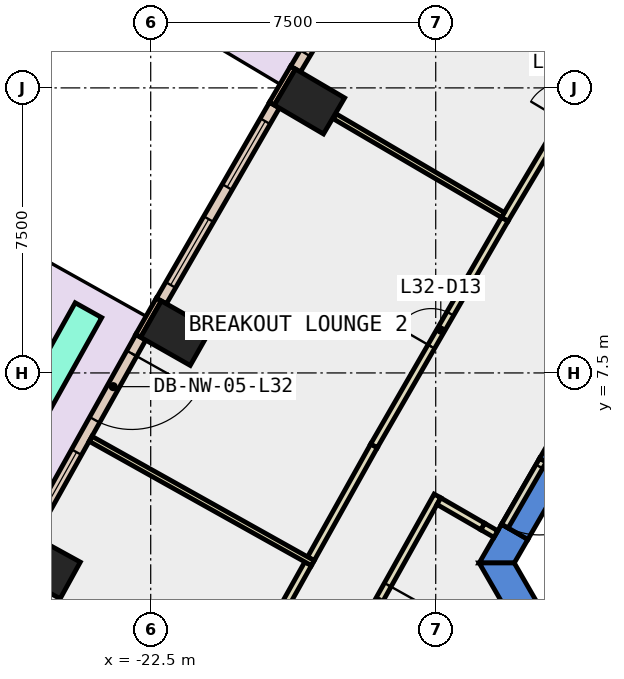
"""IFC4 building model, lengths in metres.
Left out: names, types, materials, properties, quantities, classifications, styles, units other than length and angle.
Written with IfcOpenShell. Run it as: python <this file> out.ifc"""

import sys

from ifc_helpers import new_model, si_unit, direction, frame, frame_2d, origin, origin_2d, place, context, subcontext, project, spatial, polyline, rectangle, outline, extrude, element, fill, save


model = new_model("IFC4")
c1 = context("Model", 3, precision=1e-05, world=origin(), true_north=direction((0.0, 1.0)))
c2 = subcontext(c1, "Body", "Model", "MODEL_VIEW")
j1 = project(units=[si_unit("LENGTHUNIT", "METRE"), si_unit("PLANEANGLEUNIT", "RADIAN")], contexts=[c1])
p1 = place(None, origin())
s1 = spatial("IfcSite", under=j1, at=p1, CompositionType="ELEMENT")
p2 = place(p1, origin())
s2 = spatial("IfcBuilding", under=s1, at=p2, CompositionType="ELEMENT")
p3 = place(p2, frame((0.0, 0.0, 146.6)))
s3 = spatial("IfcBuildingStorey", under=s2, at=p3, CompositionType="ELEMENT", Elevation=146.6)
for number, where, z_axis, x_axis in (
    (1, (-18.322, 14.642, -0.4), (0.0, 0.0, 1.0), (0.506, 0.863, 0.0)),
    (2, (-21.84, 8.546, -0.4), (0.0, 0.0, 1.0), (0.494, 0.869, 0.0)),
    (3, (-25.275, 2.403, -0.4), (0.0, 0.0, 1.0), (0.482, 0.876, 0.0)),
):
    element("IfcColumn", number, at=place(p3, frame(where, z_axis=z_axis, x_axis=x_axis)), inside=s3, PredefinedType="COLUMN", context=c2, shape_type="SweptSolid", body=[
        extrude(rectangle(XDim=1.1, YDim=1.5, at=origin_2d()), origin(), (0.0, 0.0, 1.0), 4.2),
    ])
p4 = place(p3, frame((0.0, 0.0, -0.4)))
e4 = element("IfcWall", 4, at=p4, inside=s3, PredefinedType="SHEAR", context=c2, shape_type="SweptSolid", body=[
    extrude(outline(polyline([(-12.267, 5.252), (-11.575, 4.852), (-6.466, 13.7), (-6.928, 14.5), (-12.267, 5.252)])), origin(), (0.0, 0.0, 1.0), 4.2),
])
p5 = place(p3, frame((0.0, 0.0, -0.4)))
e5 = element("IfcWall", 5, at=p5, inside=s3, PredefinedType="SHEAR", context=c2, shape_type="SweptSolid", body=[
    extrude(outline(polyline([(-12.575, 3.12), (-13.267, 3.52), (-13.856, 2.5), (-12.933, 2.5), (-12.575, 3.12)])), origin(), (0.0, 0.0, 1.0), 4.2),
])
p6 = place(p3, frame((0.0, 0.0, 3.6)))
e6 = element("IfcWall", 6, at=p6, inside=s3, PredefinedType="SHEAR", context=c2, shape_type="SweptSolid", body=[
    extrude(outline(polyline([(-13.267, 3.52), (-12.575, 3.12), (-11.575, 4.852), (-12.267, 5.252), (-13.267, 3.52)])), origin(), (0.0, 0.0, 1.0), 0.2),
])
p7 = place(p3, frame((0.0, 0.0, -0.4)))
e7 = element("IfcWall", 7, at=p7, inside=s3, PredefinedType="SHEAR", context=c2, shape_type="SweptSolid", body=[
    extrude(outline(polyline([(-13.856, 2.5), (-6.928, -9.5), (-6.466, -8.7), (-12.933, 2.5), (-13.856, 2.5)])), origin(), (0.0, 0.0, 1.0), 4.2),
])
p8 = place(p3, frame((-18.755, 15.533, 0.0), z_axis=(0.0, 0.0, 1.0), x_axis=(-0.50667077411, -0.862139621327, 0.0)))
e8 = element("IfcWall", 8, at=p8, inside=s3, PredefinedType="STANDARD", context=c2, shape_type="SweptSolid", body=[
    extrude(rectangle(XDim=1.1, YDim=0.15, at=frame_2d((0.55, 0.0))), origin(), (0.0, 0.0, 1.0), 3.8),
])
p9 = place(p3, frame((-22.286, 9.432, 0.0), z_axis=(0.0, 0.0, 1.0), x_axis=(-0.494775760346, -0.869020682708, 0.0)))
e9 = element("IfcWall", 9, at=p9, inside=s3, PredefinedType="STANDARD", context=c2, shape_type="SweptSolid", body=[
    extrude(rectangle(XDim=1.1, YDim=0.15, at=frame_2d((0.55, 0.0))), origin(), (0.0, 0.0, 1.0), 3.8),
])
p10 = place(p3, frame((-15.642, 20.605, 0.0), z_axis=(0.0, 0.0, 1.0), x_axis=(-0.511856715331, -0.859070836992, 0.0)))
e10 = element("IfcWall", 10, at=p10, inside=s3, PredefinedType="STANDARD", context=c2, shape_type="SweptSolid", body=[
    extrude(rectangle(XDim=5.951, YDim=0.3, at=frame_2d((2.975, 0.0))), origin(), (0.0, 0.0, 1.0), 3.8),
])
p11 = place(p10, frame((0.488, 0.0, 0.0)))
e11 = element("IfcOpeningElement", 11, at=p11, cuts=e10, PredefinedType="OPENING", context=c2, shape_type="SweptSolid", body=[
    extrude(rectangle(XDim=2.0, YDim=2.4, at=frame_2d((1.0, 1.2))), frame((0.0, 0.16, 0.0), z_axis=(0.0, -1.0, 0.0), x_axis=(1.0, 0.0, 0.0)), (0.0, 0.0, 1.0), 0.32),
])
p12 = place(p10, frame((3.463, 0.0, 0.9)))
e12 = element("IfcOpeningElement", 12, at=p12, cuts=e10, PredefinedType="OPENING", context=c2, shape_type="SweptSolid", body=[
    extrude(rectangle(XDim=2.0, YDim=2.6, at=frame_2d((1.0, 1.3))), frame((0.0, 0.16, 0.0), z_axis=(0.0, -1.0, 0.0), x_axis=(1.0, 0.0, 0.0)), (0.0, 0.0, 1.0), 0.32),
])
p13 = place(p3, frame((-19.243, 14.546, 0.0), z_axis=(0.0, 0.0, 1.0), x_axis=(-0.49994263896, -0.866058518664, 0.0)))
e13 = element("IfcWall", 13, at=p13, inside=s3, PredefinedType="STANDARD", context=c2, shape_type="SweptSolid", body=[
    extrude(rectangle(XDim=5.951, YDim=0.3, at=frame_2d((2.976, 0.0))), origin(), (0.0, 0.0, 1.0), 3.8),
])
p14 = place(p13, frame((0.488, 0.0, 0.9)))
e14 = element("IfcOpeningElement", 14, at=p14, cuts=e13, PredefinedType="OPENING", context=c2, shape_type="SweptSolid", body=[
    extrude(rectangle(XDim=2.0, YDim=2.6, at=frame_2d((1.0, 1.3))), frame((0.0, 0.16, 0.0), z_axis=(0.0, -1.0, 0.0), x_axis=(1.0, 0.0, 0.0)), (0.0, 0.0, 1.0), 0.32),
])
p15 = place(p13, frame((3.463, 0.0, 0.9)))
e15 = element("IfcOpeningElement", 15, at=p15, cuts=e13, PredefinedType="OPENING", context=c2, shape_type="SweptSolid", body=[
    extrude(rectangle(XDim=2.0, YDim=2.6, at=frame_2d((1.0, 1.3))), frame((0.0, 0.16, 0.0), z_axis=(0.0, -1.0, 0.0), x_axis=(1.0, 0.0, 0.0)), (0.0, 0.0, 1.0), 0.32),
])
p16 = place(p3, frame((-22.761, 8.438, 0.0), z_axis=(0.0, 0.0, 1.0), x_axis=(-0.488009846284, -0.872838123555, 0.0)))
e16 = element("IfcWall", 16, at=p16, inside=s3, PredefinedType="STANDARD", context=c2, shape_type="SweptSolid", body=[
    extrude(rectangle(XDim=5.951, YDim=0.3, at=frame_2d((2.976, 0.0))), origin(), (0.0, 0.0, 1.0), 3.8),
])
p17 = place(p16, frame((0.488, 0.0, 0.0)))
e17 = element("IfcOpeningElement", 17, at=p17, cuts=e16, PredefinedType="OPENING", context=c2, shape_type="SweptSolid", body=[
    extrude(rectangle(XDim=2.0, YDim=2.4, at=frame_2d((1.0, 1.2))), frame((0.0, 0.16, 0.0), z_axis=(0.0, -1.0, 0.0), x_axis=(1.0, 0.0, 0.0)), (0.0, 0.0, 1.0), 0.32),
])
p18 = place(p16, frame((3.463, 0.0, 0.9)))
e18 = element("IfcOpeningElement", 18, at=p18, cuts=e16, PredefinedType="OPENING", context=c2, shape_type="SweptSolid", body=[
    extrude(rectangle(XDim=2.0, YDim=2.6, at=frame_2d((1.0, 1.3))), frame((0.0, 0.16, 0.0), z_axis=(0.0, -1.0, 0.0), x_axis=(1.0, 0.0, 0.0)), (0.0, 0.0, 1.0), 0.32),
])
p19 = place(p3, frame((-24.138, 9.151, 0.0), z_axis=(0.0, 0.0, 1.0), x_axis=(-0.487965376719, -0.87286298531, 0.0)))
e19 = element("IfcWall", 19, at=p19, inside=s3, PredefinedType="STANDARD", context=c2, shape_type="SweptSolid", body=[
    extrude(rectangle(XDim=5.851, YDim=0.8, at=frame_2d((2.925, 0.0))), origin(), (0.0, 0.0, 1.0), 0.8),
])
p20 = place(p3, frame((-13.417, 3.26, 0.0), z_axis=(0.0, 0.0, 1.0), x_axis=(-0.866398669086, 0.499352927503, 0.0)))
e20 = element("IfcWall", 20, at=p20, inside=s3, PredefinedType="PARTITIONING", context=c2, shape_type="SweptSolid", body=[
    extrude(rectangle(XDim=0.4, YDim=0.2, at=frame_2d((0.2, 0.0))), origin(), (0.0, 0.0, 1.0), 2.4),
])
p21 = place(p3, frame((-14.955, 4.264, 0.0), z_axis=(0.0, 0.0, 1.0), x_axis=(-0.4879770011, -0.872856486713, 0.0)))
e21 = element("IfcWall", 21, at=p21, inside=s3, PredefinedType="PARTITIONING", context=c2, shape_type="SweptSolid", body=[
    extrude(rectangle(XDim=6.363, YDim=0.2, at=frame_2d((3.182, 0.0))), origin(), (0.0, 0.0, 1.0), 3.8),
])
p22 = place(p21, frame((2.681, 0.0, 0.0)))
e22 = element("IfcOpeningElement", 22, at=p22, cuts=e21, PredefinedType="OPENING", context=c2, shape_type="SweptSolid", body=[
    extrude(rectangle(XDim=1.0, YDim=2.1, at=frame_2d((0.5, 1.05))), frame((0.0, 0.11, 0.0), z_axis=(0.0, -1.0, 0.0), x_axis=(1.0, 0.0, 0.0)), (0.0, 0.0, 1.0), 0.22),
])
p23 = place(p3, frame((-13.184, 11.542, 0.0), z_axis=(0.0, 0.0, 1.0), x_axis=(0.511847713534, 0.859076200433, 0.0)))
e23 = element("IfcWall", 23, at=p23, inside=s3, PredefinedType="PARTITIONING", context=c2, shape_type="SweptSolid", body=[
    extrude(rectangle(XDim=7.03, YDim=0.2, at=frame_2d((3.515, 0.0))), origin(), (0.0, 0.0, 1.0), 3.8),
])
p24 = place(p23, frame((3.015, 0.0, 0.0)))
e24 = element("IfcOpeningElement", 24, at=p24, cuts=e23, PredefinedType="OPENING", context=c2, shape_type="SweptSolid", body=[
    extrude(rectangle(XDim=1.0, YDim=2.1, at=frame_2d((0.5, 1.05))), frame((0.0, 0.11, 0.0), z_axis=(0.0, -1.0, 0.0), x_axis=(1.0, 0.0, 0.0)), (0.0, 0.0, 1.0), 0.22),
])
p25 = place(p3, frame((-18.284, 2.612, 0.0), z_axis=(0.0, 0.0, 1.0), x_axis=(0.487871212611, 0.872915620152, 0.0)))
e25 = element("IfcWall", 25, at=p25, inside=s3, PredefinedType="PARTITIONING", context=c2, shape_type="SweptSolid", body=[
    extrude(rectangle(XDim=3.402, YDim=0.2, at=frame_2d((1.701, 0.0))), origin(), (0.0, 0.0, 1.0), 3.8),
])
p26 = place(p3, frame((-16.624, 5.582, 0.0), z_axis=(0.0, 0.0, 1.0), x_axis=(0.499886250151, 0.866091067331, 0.0)))
e26 = element("IfcWall", 26, at=p26, inside=s3, PredefinedType="PARTITIONING", context=c2, shape_type="SweptSolid", body=[
    extrude(rectangle(XDim=6.881, YDim=0.2, at=frame_2d((3.441, 0.0))), origin(), (0.0, 0.0, 1.0), 3.8),
])
p27 = place(p26, frame((3.015, 0.0, 0.0)))
e27 = element("IfcOpeningElement", 27, at=p27, cuts=e26, PredefinedType="OPENING", context=c2, shape_type="SweptSolid", body=[
    extrude(rectangle(XDim=1.0, YDim=2.1, at=frame_2d((0.5, 1.05))), frame((0.0, 0.11, 0.0), z_axis=(0.0, -1.0, 0.0), x_axis=(1.0, 0.0, 0.0)), (0.0, 0.0, 1.0), 0.22),
])
p28 = place(p3, frame((-20.018, -0.489, 0.0), z_axis=(0.0, 0.0, 1.0), x_axis=(0.48792588674, 0.872885060617, 0.0)))
e28 = element("IfcWall", 28, at=p28, inside=s3, PredefinedType="PARTITIONING", context=c2, shape_type="SweptSolid", body=[
    extrude(rectangle(XDim=3.403, YDim=0.2, at=frame_2d((1.701, 0.0))), origin(), (0.0, 0.0, 1.0), 3.8),
])
p29 = place(p3, frame((-13.232, 11.657, 0.0), z_axis=(0.0, 0.0, 1.0), x_axis=(-0.862663606034, 0.505778116197, 0.0)))
e29 = element("IfcWall", 29, at=p29, inside=s3, PredefinedType="PARTITIONING", context=c2, shape_type="SweptSolid", body=[
    extrude(rectangle(XDim=5.131, YDim=0.15, at=frame_2d((2.565, 0.0))), origin(), (0.0, 0.0, 1.0), 3.8),
])
p30 = place(p3, frame((-18.234, 2.497, 0.0), z_axis=(0.0, 0.0, 1.0), x_axis=(-0.872820235044, 0.4880418397, 0.0)))
e30 = element("IfcWall", 30, at=p30, inside=s3, PredefinedType="PARTITIONING", context=c2, shape_type="SweptSolid", body=[
    extrude(rectangle(XDim=6.7, YDim=0.15, at=frame_2d((3.35, 0.0))), origin(), (0.0, 0.0, 1.0), 3.8),
])
p31 = place(p3, frame((-12.18, 5.202, 0.0), z_axis=(0.0, 0.0, 1.0), x_axis=(-0.50002537861, -0.866010750942, 0.0)))
e31 = element("IfcWall", 31, at=p31, inside=s3, PredefinedType="PARTITIONING", context=c2, shape_type="SweptSolid", body=[
    extrude(rectangle(XDim=2.0, YDim=0.2, at=frame_2d((1.0, 0.0))), origin(), (0.0, 0.0, 1.0), 2.4),
])
p32 = place(p31, frame((0.19, 0.0, 0.0)))
e32 = element("IfcOpeningElement", 32, at=p32, cuts=e31, PredefinedType="OPENING", context=c2, shape_type="SweptSolid", body=[
    extrude(rectangle(XDim=1.8, YDim=2.1, at=frame_2d((0.9, 1.05))), frame((0.0, 0.11, 0.0), z_axis=(0.0, -1.0, 0.0), x_axis=(1.0, 0.0, 0.0)), (0.0, 0.0, 1.0), 0.22),
])
p33 = place(p3, frame((-13.764, 3.46, 0.0), z_axis=(0.0, 0.0, 1.0), x_axis=(-0.865932130826, 0.500161518715, 0.0)))
e33 = element("IfcWall", 33, at=p33, inside=s3, PredefinedType="PARTITIONING", context=c2, shape_type="SweptSolid", body=[
    extrude(rectangle(XDim=1.332, YDim=0.2, at=frame_2d((0.666, 0.0))), origin(), (0.0, 0.0, 1.0), 3.8),
])
p34 = place(p12, origin())
e34 = element("IfcWindow", 34, at=p34, inside=s3, PartitioningType="SINGLE_PANEL", PredefinedType="WINDOW", context=c2, shape_type="SweptSolid", body=[
    extrude(rectangle(XDim=2.0, YDim=2.6, at=frame_2d((1.0, 1.3))), frame((0.0, 0.03, 0.0), z_axis=(0.0, -1.0, 0.0), x_axis=(1.0, 0.0, 0.0)), (0.0, 0.0, 1.0), 0.06),
])
fill(e12, e34)
p35 = place(p14, origin())
e35 = element("IfcWindow", 35, at=p35, inside=s3, PartitioningType="SINGLE_PANEL", PredefinedType="WINDOW", context=c2, shape_type="SweptSolid", body=[
    extrude(rectangle(XDim=2.0, YDim=2.6, at=frame_2d((1.0, 1.3))), frame((0.0, 0.03, 0.0), z_axis=(0.0, -1.0, 0.0), x_axis=(1.0, 0.0, 0.0)), (0.0, 0.0, 1.0), 0.06),
])
fill(e14, e35)
p36 = place(p15, origin())
e36 = element("IfcWindow", 36, at=p36, inside=s3, PartitioningType="SINGLE_PANEL", PredefinedType="WINDOW", context=c2, shape_type="SweptSolid", body=[
    extrude(rectangle(XDim=2.0, YDim=2.6, at=frame_2d((1.0, 1.3))), frame((0.0, 0.03, 0.0), z_axis=(0.0, -1.0, 0.0), x_axis=(1.0, 0.0, 0.0)), (0.0, 0.0, 1.0), 0.06),
])
fill(e15, e36)
p37 = place(p17, origin())
e37 = element("IfcDoor", 37, at=p37, inside=s3, OperationType="SLIDING_TO_LEFT", PredefinedType="DOOR", context=c2, shape_type="SweptSolid", body=[
    extrude(rectangle(XDim=2.0, YDim=2.4, at=frame_2d((1.0, 1.2))), frame((0.0, 0.025, 0.0), z_axis=(0.0, -1.0, 0.0), x_axis=(1.0, 0.0, 0.0)), (0.0, 0.0, 1.0), 0.05),
])
fill(e17, e37)
p38 = place(p18, origin())
e38 = element("IfcWindow", 38, at=p38, inside=s3, PartitioningType="SINGLE_PANEL", PredefinedType="WINDOW", context=c2, shape_type="SweptSolid", body=[
    extrude(rectangle(XDim=2.0, YDim=2.6, at=frame_2d((1.0, 1.3))), frame((0.0, 0.03, 0.0), z_axis=(0.0, -1.0, 0.0), x_axis=(1.0, 0.0, 0.0)), (0.0, 0.0, 1.0), 0.06),
])
fill(e18, e38)
p39 = place(p27, origin())
e39 = element("IfcDoor", 39, at=p39, inside=s3, OperationType="SINGLE_SWING_LEFT", PredefinedType="DOOR", context=c2, shape_type="SweptSolid", body=[
    extrude(rectangle(XDim=1.0, YDim=2.1, at=frame_2d((0.5, 1.05))), frame((0.0, 0.025, 0.0), z_axis=(0.0, -1.0, 0.0), x_axis=(1.0, 0.0, 0.0)), (0.0, 0.0, 1.0), 0.05),
])
fill(e27, e39)
p40 = place(p22, origin())
e40 = element("IfcDoor", 40, at=p40, inside=s3, OperationType="SINGLE_SWING_LEFT", PredefinedType="DOOR", context=c2, shape_type="SweptSolid", body=[
    extrude(rectangle(XDim=1.0, YDim=2.1, at=frame_2d((0.5, 1.05))), frame((0.0, 0.025, 0.0), z_axis=(0.0, -1.0, 0.0), x_axis=(1.0, 0.0, 0.0)), (0.0, 0.0, 1.0), 0.05),
])
fill(e22, e40)
p41 = place(p32, origin())
e41 = element("IfcDoor", 41, at=p41, inside=s3, OperationType="DOUBLE_DOOR_SINGLE_SWING", PredefinedType="DOOR", context=c2, shape_type="SweptSolid", body=[
    extrude(rectangle(XDim=1.8, YDim=2.1, at=frame_2d((0.9, 1.05))), frame((0.0, 0.025, 0.0), z_axis=(0.0, -1.0, 0.0), x_axis=(1.0, 0.0, 0.0)), (0.0, 0.0, 1.0), 0.05),
])
fill(e32, e41)
save(model, sys.argv[1])
